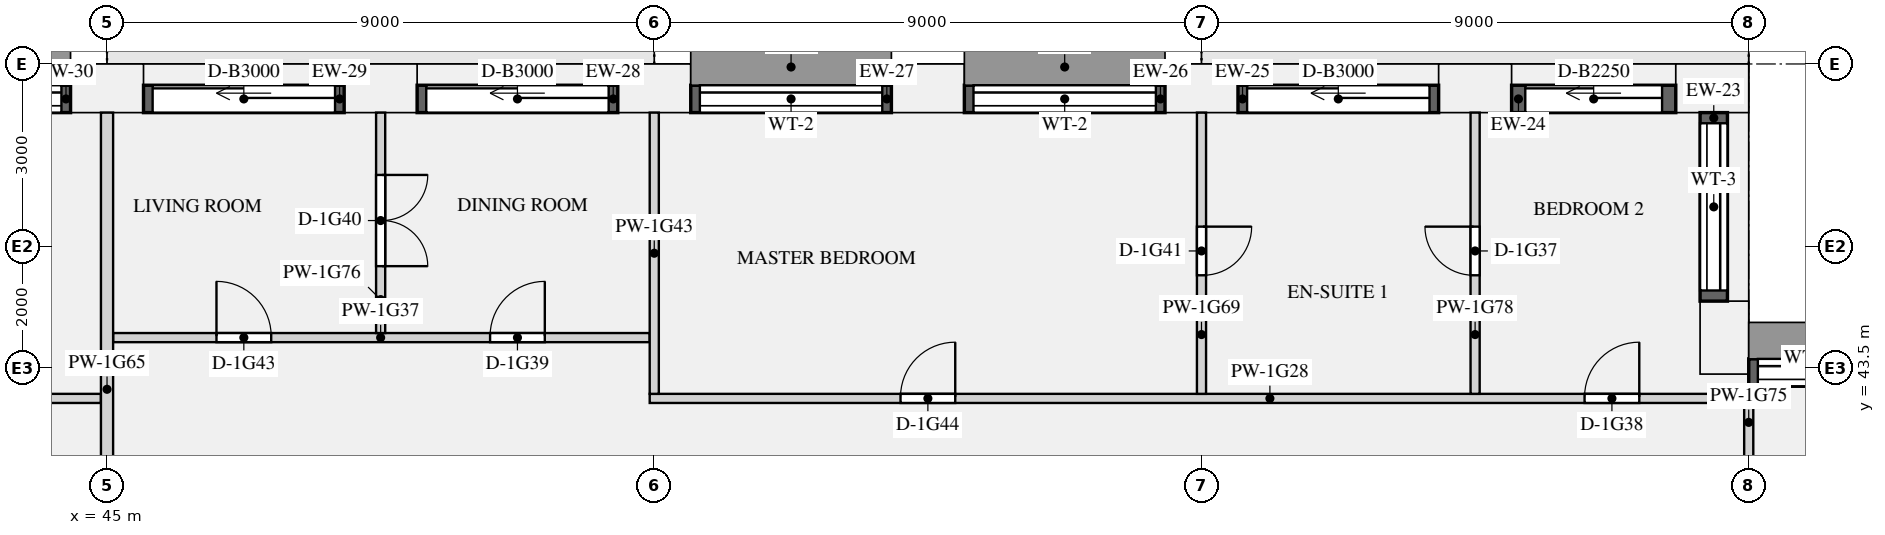
"""IFC4 building model, lengths in metres.
Left out: names, types, materials, properties, quantities, classifications, styles, units other than length and angle.
Written with IfcOpenShell. Run it as: python <this file> out.ifc"""

import sys

from ifc_helpers import new_model, si_unit, direction, frame, frame_2d, origin, origin_2d, place, context, subcontext, project, spatial, rectangle, extrude, element, fill, save


model = new_model("IFC4")
c1 = context("Model", 3, precision=1e-05, world=origin(), true_north=direction((0.0, 1.0)))
c2 = subcontext(c1, "Body", "Model", "MODEL_VIEW")
j1 = project(units=[si_unit("LENGTHUNIT", "METRE"), si_unit("PLANEANGLEUNIT", "RADIAN")], contexts=[c1])
p1 = place(None, origin())
s1 = spatial("IfcSite", under=j1, at=p1, CompositionType="ELEMENT")
p2 = place(p1, origin())
s2 = spatial("IfcBuilding", under=s1, at=p2, CompositionType="ELEMENT")
p3 = place(p2, frame((0.0, 0.0, 66.75)))
s3 = spatial("IfcBuildingStorey", under=s2, at=p3, CompositionType="ELEMENT", Elevation=66.75)
for number, where, z_axis, x_axis in (
    (1, (71.6, 44.0, 0.0), (0.0, 0.0, 1.0), (0.0, 1.0, 0.0)),
    (2, (71.4, 48.1, 0.0), (0.0, 0.0, 1.0), (-1.0, 0.0, 0.0)),
    (3, (67.5, 48.1, 0.0), (0.0, 0.0, 1.0), (-1.0, 0.0, 0.0)),
    (4, (63.0, 48.1, 0.0), (0.0, 0.0, 1.0), (-1.0, 0.0, 0.0)),
    (5, (58.5, 48.1, 0.0), (0.0, 0.0, 1.0), (-1.0, 0.0, 0.0)),
    (6, (54.0, 48.1, 0.0), (0.0, 0.0, 1.0), (-1.0, 0.0, 0.0)),
    (7, (49.5, 48.1, 0.0), (0.0, 0.0, 1.0), (-1.0, 0.0, 0.0)),
    (8, (45.0, 48.1, 0.0), (0.0, 0.0, 1.0), (-1.0, 0.0, 0.0)),
):
    element("IfcColumn", number, at=place(p3, frame(where, z_axis=z_axis, x_axis=x_axis)), inside=s3, PredefinedType="USERDEFINED", context=c2, shape_type="SweptSolid", body=[
        extrude(rectangle(XDim=1.2, YDim=0.8, at=origin_2d()), origin(), (0.0, 0.0, 1.0), 3.15),
    ])
p4 = place(p3, frame((75.3, 43.425, 0.9), z_axis=(0.0, 0.0, 1.0), x_axis=(-1.0, 0.0, 0.0)))
e9 = element("IfcWall", 9, at=p4, inside=s3, PredefinedType="SOLIDWALL", context=c2, shape_type="SweptSolid", body=[
    extrude(rectangle(XDim=3.3, YDim=0.45, at=frame_2d((1.65, 0.0))), origin(), (0.0, 0.0, 1.0), 1.93),
])
p5 = place(p4, frame((0.15, 0.0, 0.15)))
e10 = element("IfcOpeningElement", 10, at=p5, cuts=e9, PredefinedType="OPENING", context=c2, shape_type="SweptSolid", body=[
    extrude(rectangle(XDim=3.0, YDim=1.5, at=frame_2d((1.5, 0.75))), frame((0.0, 0.235, 0.0), z_axis=(0.0, -1.0, 0.0), x_axis=(1.0, 0.0, 0.0)), (0.0, 0.0, 1.0), 0.47),
])
p6 = place(p3, frame((71.425, 44.6, 0.9), z_axis=(0.0, 0.0, 1.0), x_axis=(0.0, 1.0, 0.0)))
e11 = element("IfcWall", 11, at=p6, inside=s3, PredefinedType="SOLIDWALL", context=c2, shape_type="SweptSolid", body=[
    extrude(rectangle(XDim=3.1, YDim=0.45, at=frame_2d((1.55, 0.0))), origin(), (0.0, 0.0, 1.0), 1.93),
])
p7 = place(p6, frame((0.175, 0.0, 0.15)))
e12 = element("IfcOpeningElement", 12, at=p7, cuts=e11, PredefinedType="OPENING", context=c2, shape_type="SweptSolid", body=[
    extrude(rectangle(XDim=2.75, YDim=1.5, at=frame_2d((1.375, 0.75))), frame((0.0, 0.235, 0.0), z_axis=(0.0, -1.0, 0.0), x_axis=(1.0, 0.0, 0.0)), (0.0, 0.0, 1.0), 0.47),
])
p8 = place(p3, frame((70.8, 47.925, 0.0), z_axis=(0.0, 0.0, 1.0), x_axis=(-1.0, 0.0, 0.0)))
e13 = element("IfcWall", 13, at=p8, inside=s3, PredefinedType="SOLIDWALL", context=c2, shape_type="SweptSolid", body=[
    extrude(rectangle(XDim=2.7, YDim=0.45, at=frame_2d((1.35, 0.0))), origin(), (0.0, 0.0, 1.0), 2.83),
])
p9 = place(p8, frame((0.225, 0.0, 0.0)))
e14 = element("IfcOpeningElement", 14, at=p9, cuts=e13, PredefinedType="OPENING", context=c2, shape_type="SweptSolid", body=[
    extrude(rectangle(XDim=2.25, YDim=2.3, at=frame_2d((1.125, 1.15))), frame((0.0, 0.235, 0.0), z_axis=(0.0, -1.0, 0.0), x_axis=(1.0, 0.0, 0.0)), (0.0, 0.0, 1.0), 0.47),
])
p10 = place(p3, frame((66.9, 47.925, 0.0), z_axis=(0.0, 0.0, 1.0), x_axis=(-1.0, 0.0, 0.0)))
e15 = element("IfcWall", 15, at=p10, inside=s3, PredefinedType="SOLIDWALL", context=c2, shape_type="SweptSolid", body=[
    extrude(rectangle(XDim=3.3, YDim=0.45, at=frame_2d((1.65, 0.0))), origin(), (0.0, 0.0, 1.0), 2.83),
])
p11 = place(p10, frame((0.15, 0.0, 0.0)))
e16 = element("IfcOpeningElement", 16, at=p11, cuts=e15, PredefinedType="OPENING", context=c2, shape_type="SweptSolid", body=[
    extrude(rectangle(XDim=3.0, YDim=2.3, at=frame_2d((1.5, 1.15))), frame((0.0, 0.235, 0.0), z_axis=(0.0, -1.0, 0.0), x_axis=(1.0, 0.0, 0.0)), (0.0, 0.0, 1.0), 0.47),
])
p12 = place(p3, frame((62.4, 47.925, 0.9), z_axis=(0.0, 0.0, 1.0), x_axis=(-1.0, 0.0, 0.0)))
e17 = element("IfcWall", 17, at=p12, inside=s3, PredefinedType="SOLIDWALL", context=c2, shape_type="SweptSolid", body=[
    extrude(rectangle(XDim=3.3, YDim=0.45, at=frame_2d((1.65, 0.0))), origin(), (0.0, 0.0, 1.0), 1.93),
])
p13 = place(p12, frame((0.15, 0.0, 0.15)))
e18 = element("IfcOpeningElement", 18, at=p13, cuts=e17, PredefinedType="OPENING", context=c2, shape_type="SweptSolid", body=[
    extrude(rectangle(XDim=3.0, YDim=1.5, at=frame_2d((1.5, 0.75))), frame((0.0, 0.235, 0.0), z_axis=(0.0, -1.0, 0.0), x_axis=(1.0, 0.0, 0.0)), (0.0, 0.0, 1.0), 0.47),
])
p14 = place(p3, frame((57.9, 47.925, 0.9), z_axis=(0.0, 0.0, 1.0), x_axis=(-1.0, 0.0, 0.0)))
e19 = element("IfcWall", 19, at=p14, inside=s3, PredefinedType="SOLIDWALL", context=c2, shape_type="SweptSolid", body=[
    extrude(rectangle(XDim=3.3, YDim=0.45, at=frame_2d((1.65, 0.0))), origin(), (0.0, 0.0, 1.0), 1.93),
])
p15 = place(p14, frame((0.15, 0.0, 0.15)))
e20 = element("IfcOpeningElement", 20, at=p15, cuts=e19, PredefinedType="OPENING", context=c2, shape_type="SweptSolid", body=[
    extrude(rectangle(XDim=3.0, YDim=1.5, at=frame_2d((1.5, 0.75))), frame((0.0, 0.235, 0.0), z_axis=(0.0, -1.0, 0.0), x_axis=(1.0, 0.0, 0.0)), (0.0, 0.0, 1.0), 0.47),
])
p16 = place(p3, frame((53.4, 47.925, 0.0), z_axis=(0.0, 0.0, 1.0), x_axis=(-1.0, 0.0, 0.0)))
e21 = element("IfcWall", 21, at=p16, inside=s3, PredefinedType="SOLIDWALL", context=c2, shape_type="SweptSolid", body=[
    extrude(rectangle(XDim=3.3, YDim=0.45, at=frame_2d((1.65, 0.0))), origin(), (0.0, 0.0, 1.0), 2.83),
])
p17 = place(p16, frame((0.15, 0.0, 0.0)))
e22 = element("IfcOpeningElement", 22, at=p17, cuts=e21, PredefinedType="OPENING", context=c2, shape_type="SweptSolid", body=[
    extrude(rectangle(XDim=3.0, YDim=2.3, at=frame_2d((1.5, 1.15))), frame((0.0, 0.235, 0.0), z_axis=(0.0, -1.0, 0.0), x_axis=(1.0, 0.0, 0.0)), (0.0, 0.0, 1.0), 0.47),
])
p18 = place(p3, frame((48.9, 47.925, 0.0), z_axis=(0.0, 0.0, 1.0), x_axis=(-1.0, 0.0, 0.0)))
e23 = element("IfcWall", 23, at=p18, inside=s3, PredefinedType="SOLIDWALL", context=c2, shape_type="SweptSolid", body=[
    extrude(rectangle(XDim=3.3, YDim=0.45, at=frame_2d((1.65, 0.0))), origin(), (0.0, 0.0, 1.0), 2.83),
])
p19 = place(p18, frame((0.15, 0.0, 0.0)))
e24 = element("IfcOpeningElement", 24, at=p19, cuts=e23, PredefinedType="OPENING", context=c2, shape_type="SweptSolid", body=[
    extrude(rectangle(XDim=3.0, YDim=2.3, at=frame_2d((1.5, 1.15))), frame((0.0, 0.235, 0.0), z_axis=(0.0, -1.0, 0.0), x_axis=(1.0, 0.0, 0.0)), (0.0, 0.0, 1.0), 0.47),
])
p20 = place(p3, frame((44.4, 47.925, 0.9), z_axis=(0.0, 0.0, 1.0), x_axis=(-1.0, 0.0, 0.0)))
e25 = element("IfcWall", 25, at=p20, inside=s3, PredefinedType="SOLIDWALL", context=c2, shape_type="SweptSolid", body=[
    extrude(rectangle(XDim=3.3, YDim=0.45, at=frame_2d((1.65, 0.0))), origin(), (0.0, 0.0, 1.0), 1.93),
])
p21 = place(p20, frame((0.15, 0.0, 0.15)))
e26 = element("IfcOpeningElement", 26, at=p21, cuts=e25, PredefinedType="OPENING", context=c2, shape_type="SweptSolid", body=[
    extrude(rectangle(XDim=3.0, YDim=1.5, at=frame_2d((1.5, 0.75))), frame((0.0, 0.235, 0.0), z_axis=(0.0, -1.0, 0.0), x_axis=(1.0, 0.0, 0.0)), (0.0, 0.0, 1.0), 0.47),
])
p22 = place(p3, frame((18.075, 43.0, 0.0), z_axis=(0.0, 0.0, 1.0), x_axis=(1.0, 0.0, 0.0)))
e27 = element("IfcWall", 27, at=p22, inside=s3, PredefinedType="PARTITIONING", context=c2, shape_type="SweptSolid", body=[
    extrude(rectangle(XDim=26.825, YDim=0.15, at=frame_2d((13.413, 0.0))), origin(), (0.0, 0.0, 1.0), 2.83),
])
p23 = place(p22, frame((14.925, 0.0, 0.0)))
e28 = element("IfcOpeningElement", 28, at=p23, cuts=e27, PredefinedType="OPENING", context=c2, shape_type="SweptSolid", body=[
    extrude(rectangle(XDim=1.5, YDim=2.1, at=frame_2d((0.75, 1.05))), frame((0.0, 0.085, 0.0), z_axis=(0.0, -1.0, 0.0), x_axis=(1.0, 0.0, 0.0)), (0.0, 0.0, 1.0), 0.17),
])
p24 = place(p22, frame((11.475, 0.0, 0.0)))
e29 = element("IfcOpeningElement", 29, at=p24, cuts=e27, PredefinedType="OPENING", context=c2, shape_type="SweptSolid", body=[
    extrude(rectangle(XDim=0.9, YDim=2.1, at=frame_2d((0.45, 1.05))), frame((0.0, 0.085, 0.0), z_axis=(0.0, -1.0, 0.0), x_axis=(1.0, 0.0, 0.0)), (0.0, 0.0, 1.0), 0.17),
])
p25 = place(p22, frame((2.475, 0.0, 0.0)))
e30 = element("IfcOpeningElement", 30, at=p25, cuts=e27, PredefinedType="OPENING", context=c2, shape_type="SweptSolid", body=[
    extrude(rectangle(XDim=0.9, YDim=2.1, at=frame_2d((0.45, 1.05))), frame((0.0, 0.085, 0.0), z_axis=(0.0, -1.0, 0.0), x_axis=(1.0, 0.0, 0.0)), (0.0, 0.0, 1.0), 0.17),
])
p26 = place(p22, frame((21.675, 0.0, 0.0)))
e31 = element("IfcOpeningElement", 31, at=p26, cuts=e27, PredefinedType="OPENING", context=c2, shape_type="SweptSolid", body=[
    extrude(rectangle(XDim=1.5, YDim=2.1, at=frame_2d((0.75, 1.05))), frame((0.0, 0.085, 0.0), z_axis=(0.0, -1.0, 0.0), x_axis=(1.0, 0.0, 0.0)), (0.0, 0.0, 1.0), 0.17),
])
p27 = place(p3, frame((53.925, 43.0, 0.0), z_axis=(0.0, 0.0, 1.0), x_axis=(1.0, 0.0, 0.0)))
e32 = element("IfcWall", 32, at=p27, inside=s3, PredefinedType="PARTITIONING", context=c2, shape_type="SweptSolid", body=[
    extrude(rectangle(XDim=18.0, YDim=0.15, at=frame_2d((9.0, 0.0))), origin(), (0.0, 0.0, 1.0), 2.83),
])
p28 = place(p27, frame((15.375, 0.0, 0.0)))
e33 = element("IfcOpeningElement", 33, at=p28, cuts=e32, PredefinedType="OPENING", context=c2, shape_type="SweptSolid", body=[
    extrude(rectangle(XDim=0.9, YDim=2.1, at=frame_2d((0.45, 1.05))), frame((0.0, 0.085, 0.0), z_axis=(0.0, -1.0, 0.0), x_axis=(1.0, 0.0, 0.0)), (0.0, 0.0, 1.0), 0.17),
])
p29 = place(p27, frame((4.125, 0.0, 0.0)))
e34 = element("IfcOpeningElement", 34, at=p29, cuts=e32, PredefinedType="OPENING", context=c2, shape_type="SweptSolid", body=[
    extrude(rectangle(XDim=0.9, YDim=2.1, at=frame_2d((0.45, 1.05))), frame((0.0, 0.085, 0.0), z_axis=(0.0, -1.0, 0.0), x_axis=(1.0, 0.0, 0.0)), (0.0, 0.0, 1.0), 0.17),
])
p30 = place(p3, frame((45.1, 44.0, 0.0), z_axis=(0.0, 0.0, 1.0), x_axis=(1.0, 0.0, 0.0)))
e35 = element("IfcWall", 35, at=p30, inside=s3, PredefinedType="PARTITIONING", context=c2, shape_type="SweptSolid", body=[
    extrude(rectangle(XDim=8.825, YDim=0.15, at=frame_2d((4.413, 0.0))), origin(), (0.0, 0.0, 1.0), 2.83),
])
p31 = place(p30, frame((6.2, 0.0, 0.0)))
e36 = element("IfcOpeningElement", 36, at=p31, cuts=e35, PredefinedType="OPENING", context=c2, shape_type="SweptSolid", body=[
    extrude(rectangle(XDim=0.9, YDim=2.1, at=frame_2d((0.45, 1.05))), frame((0.0, 0.085, 0.0), z_axis=(0.0, -1.0, 0.0), x_axis=(1.0, 0.0, 0.0)), (0.0, 0.0, 1.0), 0.17),
])
p32 = place(p30, frame((1.7, 0.0, 0.0)))
e37 = element("IfcOpeningElement", 37, at=p32, cuts=e35, PredefinedType="OPENING", context=c2, shape_type="SweptSolid", body=[
    extrude(rectangle(XDim=0.9, YDim=2.1, at=frame_2d((0.45, 1.05))), frame((0.0, 0.085, 0.0), z_axis=(0.0, -1.0, 0.0), x_axis=(1.0, 0.0, 0.0)), (0.0, 0.0, 1.0), 0.17),
])
p33 = place(p3, frame((54.0, 43.075, 0.0), z_axis=(0.0, 0.0, 1.0), x_axis=(0.0, 1.0, 0.0)))
e38 = element("IfcWall", 38, at=p33, inside=s3, PredefinedType="PARTITIONING", context=c2, shape_type="SweptSolid", body=[
    extrude(rectangle(XDim=4.625, YDim=0.15, at=frame_2d((2.312, 0.0))), origin(), (0.0, 0.0, 1.0), 2.83),
])
p34 = place(p3, frame((45.0, 38.6, 0.0), z_axis=(0.0, 0.0, 1.0), x_axis=(0.0, 1.0, 0.0)))
e39 = element("IfcWall", 39, at=p34, inside=s3, PredefinedType="PARTITIONING", context=c2, shape_type="SweptSolid", body=[
    extrude(rectangle(XDim=9.1, YDim=0.2, at=frame_2d((4.55, 0.0))), origin(), (0.0, 0.0, 1.0), 2.83),
])
p35 = place(p3, frame((63.0, 43.075, 0.0), z_axis=(0.0, 0.0, 1.0), x_axis=(0.0, 1.0, 0.0)))
e40 = element("IfcWall", 40, at=p35, inside=s3, PredefinedType="PARTITIONING", context=c2, shape_type="SweptSolid", body=[
    extrude(rectangle(XDim=4.625, YDim=0.15, at=frame_2d((2.312, 0.0))), origin(), (0.0, 0.0, 1.0), 2.83),
])
p36 = place(p35, frame((1.95, 0.0, 0.0)))
e41 = element("IfcOpeningElement", 41, at=p36, cuts=e40, PredefinedType="OPENING", context=c2, shape_type="SweptSolid", body=[
    extrude(rectangle(XDim=0.8, YDim=2.1, at=frame_2d((0.4, 1.05))), frame((0.0, 0.085, 0.0), z_axis=(0.0, -1.0, 0.0), x_axis=(1.0, 0.0, 0.0)), (0.0, 0.0, 1.0), 0.17),
])
p37 = place(p3, frame((72.0, 40.2, 0.0), z_axis=(0.0, 0.0, 1.0), x_axis=(0.0, 1.0, 0.0)))
e42 = element("IfcWall", 42, at=p37, inside=s3, PredefinedType="PARTITIONING", context=c2, shape_type="SweptSolid", body=[
    extrude(rectangle(XDim=3.0, YDim=0.15, at=frame_2d((1.5, 0.0))), origin(), (0.0, 0.0, 1.0), 2.83),
])
p38 = place(p37, frame((0.912, 0.0, 0.0)))
e43 = element("IfcOpeningElement", 43, at=p38, cuts=e42, PredefinedType="OPENING", context=c2, shape_type="SweptSolid", body=[
    extrude(rectangle(XDim=0.9, YDim=2.1, at=frame_2d((0.45, 1.05))), frame((0.0, 0.085, 0.0), z_axis=(0.0, -1.0, 0.0), x_axis=(1.0, 0.0, 0.0)), (0.0, 0.0, 1.0), 0.17),
])
p39 = place(p3, frame((49.5, 44.075, 0.0), z_axis=(0.0, 0.0, 1.0), x_axis=(0.0, 1.0, 0.0)))
e44 = element("IfcWall", 44, at=p39, inside=s3, PredefinedType="PARTITIONING", context=c2, shape_type="SweptSolid", body=[
    extrude(rectangle(XDim=3.625, YDim=0.15, at=frame_2d((1.812, 0.0))), origin(), (0.0, 0.0, 1.0), 2.83),
])
p40 = place(p39, frame((1.1, 0.0, 0.0)))
e45 = element("IfcOpeningElement", 45, at=p40, cuts=e44, PredefinedType="OPENING", context=c2, shape_type="SweptSolid", body=[
    extrude(rectangle(XDim=1.5, YDim=2.1, at=frame_2d((0.75, 1.05))), frame((0.0, 0.085, 0.0), z_axis=(0.0, -1.0, 0.0), x_axis=(1.0, 0.0, 0.0)), (0.0, 0.0, 1.0), 0.17),
])
p41 = place(p3, frame((67.5, 43.075, 0.0), z_axis=(0.0, 0.0, 1.0), x_axis=(0.0, 1.0, 0.0)))
e46 = element("IfcWall", 46, at=p41, inside=s3, PredefinedType="PARTITIONING", context=c2, shape_type="SweptSolid", body=[
    extrude(rectangle(XDim=4.625, YDim=0.15, at=frame_2d((2.312, 0.0))), origin(), (0.0, 0.0, 1.0), 2.83),
])
p42 = place(p41, frame((1.95, 0.0, 0.0)))
e47 = element("IfcOpeningElement", 47, at=p42, cuts=e46, PredefinedType="OPENING", context=c2, shape_type="SweptSolid", body=[
    extrude(rectangle(XDim=0.8, YDim=2.1, at=frame_2d((0.4, 1.05))), frame((0.0, 0.085, 0.0), z_axis=(0.0, -1.0, 0.0), x_axis=(1.0, 0.0, 0.0)), (0.0, 0.0, 1.0), 0.17),
])
p43 = place(p5, origin())
e48 = element("IfcWindow", 48, at=p43, inside=s3, PartitioningType="SINGLE_PANEL", PredefinedType="WINDOW", context=c2, shape_type="SweptSolid", body=[
    extrude(rectangle(XDim=3.0, YDim=1.5, at=frame_2d((1.5, 0.75))), frame((0.0, -0.065, 0.0), z_axis=(0.0, -1.0, 0.0), x_axis=(1.0, 0.0, 0.0)), (0.0, 0.0, 1.0), 0.06),
])
fill(e10, e48)
p44 = place(p7, origin())
e49 = element("IfcWindow", 49, at=p44, inside=s3, PartitioningType="SINGLE_PANEL", PredefinedType="WINDOW", context=c2, shape_type="SweptSolid", body=[
    extrude(rectangle(XDim=2.75, YDim=1.5, at=frame_2d((1.375, 0.75))), frame((0.0, -0.065, 0.0), z_axis=(0.0, -1.0, 0.0), x_axis=(1.0, 0.0, 0.0)), (0.0, 0.0, 1.0), 0.06),
])
fill(e12, e49)
p45 = place(p9, origin())
e50 = element("IfcDoor", 50, at=p45, inside=s3, OperationType="SLIDING_TO_LEFT", PredefinedType="DOOR", context=c2, shape_type="SweptSolid", body=[
    extrude(rectangle(XDim=2.25, YDim=2.3, at=frame_2d((1.125, 1.15))), frame((0.0, -0.07, 0.0), z_axis=(0.0, -1.0, 0.0), x_axis=(1.0, 0.0, 0.0)), (0.0, 0.0, 1.0), 0.05),
])
fill(e14, e50)
p46 = place(p11, origin())
e51 = element("IfcDoor", 51, at=p46, inside=s3, OperationType="SLIDING_TO_LEFT", PredefinedType="DOOR", context=c2, shape_type="SweptSolid", body=[
    extrude(rectangle(XDim=3.0, YDim=2.3, at=frame_2d((1.5, 1.15))), frame((0.0, -0.07, 0.0), z_axis=(0.0, -1.0, 0.0), x_axis=(1.0, 0.0, 0.0)), (0.0, 0.0, 1.0), 0.05),
])
fill(e16, e51)
p47 = place(p13, origin())
e52 = element("IfcWindow", 52, at=p47, inside=s3, PartitioningType="SINGLE_PANEL", PredefinedType="WINDOW", context=c2, shape_type="SweptSolid", body=[
    extrude(rectangle(XDim=3.0, YDim=1.5, at=frame_2d((1.5, 0.75))), frame((0.0, -0.065, 0.0), z_axis=(0.0, -1.0, 0.0), x_axis=(1.0, 0.0, 0.0)), (0.0, 0.0, 1.0), 0.06),
])
fill(e18, e52)
p48 = place(p15, origin())
e53 = element("IfcWindow", 53, at=p48, inside=s3, PartitioningType="SINGLE_PANEL", PredefinedType="WINDOW", context=c2, shape_type="SweptSolid", body=[
    extrude(rectangle(XDim=3.0, YDim=1.5, at=frame_2d((1.5, 0.75))), frame((0.0, -0.065, 0.0), z_axis=(0.0, -1.0, 0.0), x_axis=(1.0, 0.0, 0.0)), (0.0, 0.0, 1.0), 0.06),
])
fill(e20, e53)
p49 = place(p17, origin())
e54 = element("IfcDoor", 54, at=p49, inside=s3, OperationType="SLIDING_TO_LEFT", PredefinedType="DOOR", context=c2, shape_type="SweptSolid", body=[
    extrude(rectangle(XDim=3.0, YDim=2.3, at=frame_2d((1.5, 1.15))), frame((0.0, -0.07, 0.0), z_axis=(0.0, -1.0, 0.0), x_axis=(1.0, 0.0, 0.0)), (0.0, 0.0, 1.0), 0.05),
])
fill(e22, e54)
p50 = place(p19, origin())
e55 = element("IfcDoor", 55, at=p50, inside=s3, OperationType="SLIDING_TO_LEFT", PredefinedType="DOOR", context=c2, shape_type="SweptSolid", body=[
    extrude(rectangle(XDim=3.0, YDim=2.3, at=frame_2d((1.5, 1.15))), frame((0.0, -0.07, 0.0), z_axis=(0.0, -1.0, 0.0), x_axis=(1.0, 0.0, 0.0)), (0.0, 0.0, 1.0), 0.05),
])
fill(e24, e55)
p51 = place(p21, origin())
e56 = element("IfcWindow", 56, at=p51, inside=s3, PartitioningType="SINGLE_PANEL", PredefinedType="WINDOW", context=c2, shape_type="SweptSolid", body=[
    extrude(rectangle(XDim=3.0, YDim=1.5, at=frame_2d((1.5, 0.75))), frame((0.0, -0.065, 0.0), z_axis=(0.0, -1.0, 0.0), x_axis=(1.0, 0.0, 0.0)), (0.0, 0.0, 1.0), 0.06),
])
fill(e26, e56)
p52 = place(p42, origin())
e57 = element("IfcDoor", 57, at=p52, inside=s3, OperationType="SINGLE_SWING_RIGHT", PredefinedType="DOOR", context=c2, shape_type="SweptSolid", body=[
    extrude(rectangle(XDim=0.8, YDim=2.1, at=frame_2d((0.4, 1.05))), frame((0.0, 0.025, 0.0), z_axis=(0.0, -1.0, 0.0), x_axis=(1.0, 0.0, 0.0)), (0.0, 0.0, 1.0), 0.05),
])
fill(e47, e57)
p53 = place(p28, origin())
e58 = element("IfcDoor", 58, at=p53, inside=s3, OperationType="SINGLE_SWING_RIGHT", PredefinedType="DOOR", context=c2, shape_type="SweptSolid", body=[
    extrude(rectangle(XDim=0.9, YDim=2.1, at=frame_2d((0.45, 1.05))), frame((0.0, 0.025, 0.0), z_axis=(0.0, -1.0, 0.0), x_axis=(1.0, 0.0, 0.0)), (0.0, 0.0, 1.0), 0.05),
])
fill(e33, e58)
p54 = place(p31, origin())
e59 = element("IfcDoor", 59, at=p54, inside=s3, OperationType="SINGLE_SWING_RIGHT", PredefinedType="DOOR", context=c2, shape_type="SweptSolid", body=[
    extrude(rectangle(XDim=0.9, YDim=2.1, at=frame_2d((0.45, 1.05))), frame((0.0, 0.025, 0.0), z_axis=(0.0, -1.0, 0.0), x_axis=(1.0, 0.0, 0.0)), (0.0, 0.0, 1.0), 0.05),
])
fill(e36, e59)
p55 = place(p40, frame((1.5, 0.0, 0.0), z_axis=(0.0, 0.0, 1.0), x_axis=(-1.0, 0.0, 0.0)))
e60 = element("IfcDoor", 60, at=p55, inside=s3, OperationType="DOUBLE_DOOR_SINGLE_SWING", PredefinedType="DOOR", context=c2, shape_type="SweptSolid", body=[
    extrude(rectangle(XDim=1.5, YDim=2.1, at=frame_2d((0.75, 1.05))), frame((0.0, 0.025, 0.0), z_axis=(0.0, -1.0, 0.0), x_axis=(1.0, 0.0, 0.0)), (0.0, 0.0, 1.0), 0.05),
])
fill(e45, e60)
p56 = place(p36, frame((0.8, 0.0, 0.0), z_axis=(0.0, 0.0, 1.0), x_axis=(-1.0, 0.0, 0.0)))
e61 = element("IfcDoor", 61, at=p56, inside=s3, OperationType="SINGLE_SWING_LEFT", PredefinedType="DOOR", context=c2, shape_type="SweptSolid", body=[
    extrude(rectangle(XDim=0.8, YDim=2.1, at=frame_2d((0.4, 1.05))), frame((0.0, 0.025, 0.0), z_axis=(0.0, -1.0, 0.0), x_axis=(1.0, 0.0, 0.0)), (0.0, 0.0, 1.0), 0.05),
])
fill(e41, e61)
p57 = place(p32, origin())
e62 = element("IfcDoor", 62, at=p57, inside=s3, OperationType="SINGLE_SWING_LEFT", PredefinedType="DOOR", context=c2, shape_type="SweptSolid", body=[
    extrude(rectangle(XDim=0.9, YDim=2.1, at=frame_2d((0.45, 1.05))), frame((0.0, 0.025, 0.0), z_axis=(0.0, -1.0, 0.0), x_axis=(1.0, 0.0, 0.0)), (0.0, 0.0, 1.0), 0.05),
])
fill(e37, e62)
p58 = place(p29, origin())
e63 = element("IfcDoor", 63, at=p58, inside=s3, OperationType="SINGLE_SWING_RIGHT", PredefinedType="DOOR", context=c2, shape_type="SweptSolid", body=[
    extrude(rectangle(XDim=0.9, YDim=2.1, at=frame_2d((0.45, 1.05))), frame((0.0, 0.025, 0.0), z_axis=(0.0, -1.0, 0.0), x_axis=(1.0, 0.0, 0.0)), (0.0, 0.0, 1.0), 0.05),
])
fill(e34, e63)
save(model, sys.argv[1])
